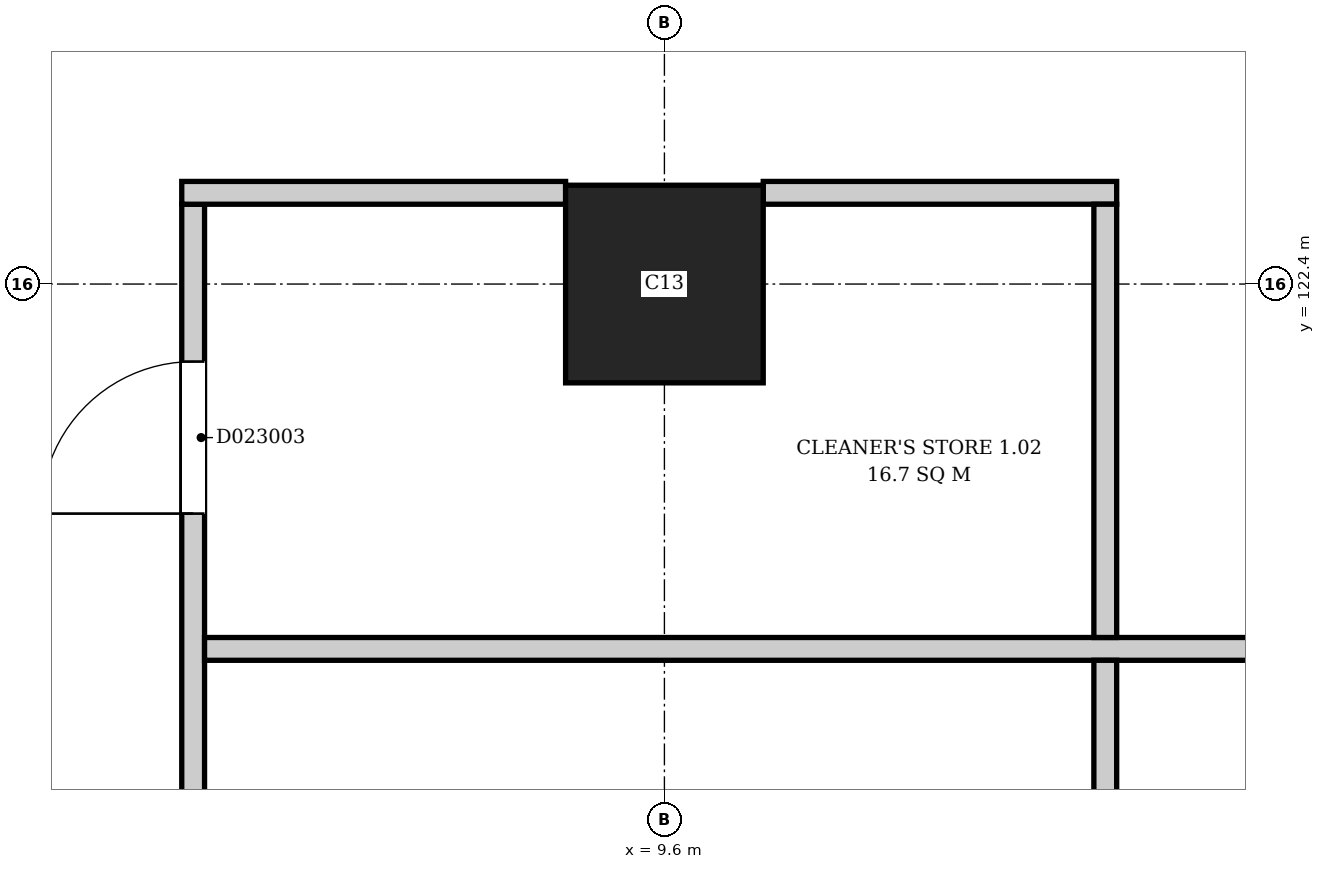
"""IFC4 building model, lengths in metres.
Left out: names, types, materials, properties, quantities, classifications, styles, units other than length and angle.
Written with IfcOpenShell. Run it as: python <this file> out.ifc"""

import sys

from ifc_helpers import new_model, si_unit, direction, frame, frame_2d, origin, origin_2d, place, context, subcontext, project, spatial, rectangle, extrude, element, fill, save


model = new_model("IFC4")
c1 = context("Model", 3, precision=1e-05, world=origin(), true_north=direction((0.0, 1.0)))
c2 = subcontext(c1, "Body", "Model", "MODEL_VIEW")
j1 = project(units=[si_unit("LENGTHUNIT", "METRE"), si_unit("PLANEANGLEUNIT", "RADIAN")], contexts=[c1])
p1 = place(None, origin())
s1 = spatial("IfcSite", under=j1, at=p1, CompositionType="ELEMENT")
p2 = place(p1, origin())
s2 = spatial("IfcBuilding", under=s1, at=p2, CompositionType="ELEMENT")
p3 = place(p2, frame((0.0, 0.0, 6.5)))
s3 = spatial("IfcBuildingStorey", under=s2, at=p3, CompositionType="ELEMENT", Elevation=6.5)
p4 = place(p3, frame((9.6, 122.4, 0.0), z_axis=(0.0, 0.0, 1.0), x_axis=(1.0, 0.0, 0.0)))
e1 = element("IfcColumn", 1, at=p4, inside=s3, PredefinedType="COLUMN", context=c2, shape_type="SweptSolid", body=[
    extrude(rectangle(XDim=1.3, YDim=1.3, at=origin_2d()), origin(), (0.0, 0.0, 1.0), 7.7),
])
p5 = place(p3, frame((6.5, 114.375, 0.0), z_axis=(0.0, 0.0, 1.0), x_axis=(0.0, 1.0, 0.0)))
e2 = element("IfcWall", 2, at=p5, inside=s3, PredefinedType="PARTITIONING", context=c2, shape_type="SweptSolid", body=[
    extrude(rectangle(XDim=8.55, YDim=0.15, at=frame_2d((4.275, 0.0))), origin(), (0.0, 0.0, 1.0), 7.29),
])
p6 = place(p5, frame((6.515, 0.0, 0.0)))
e3 = element("IfcOpeningElement", 3, at=p6, cuts=e2, PredefinedType="OPENING", context=c2, shape_type="SweptSolid", body=[
    extrude(rectangle(XDim=1.0, YDim=2.1, at=frame_2d((0.5, 1.05))), frame((0.0, 0.085, 0.0), z_axis=(0.0, -1.0, 0.0), x_axis=(1.0, 0.0, 0.0)), (0.0, 0.0, 1.0), 0.17),
])
p7 = place(p3, frame((6.425, 123.0, 0.0), z_axis=(0.0, 0.0, 1.0), x_axis=(1.0, 0.0, 0.0)))
e4 = element("IfcWall", 4, at=p7, inside=s3, PredefinedType="PARTITIONING", context=c2, shape_type="SweptSolid", body=[
    extrude(rectangle(XDim=2.525, YDim=0.15, at=frame_2d((1.262, 0.0))), origin(), (0.0, 0.0, 1.0), 7.29),
])
p8 = place(p3, frame((6.575, 120.0, 0.0), z_axis=(0.0, 0.0, 1.0), x_axis=(1.0, 0.0, 0.0)))
e5 = element("IfcWall", 5, at=p8, inside=s3, PredefinedType="PARTITIONING", context=c2, shape_type="SweptSolid", body=[
    extrude(rectangle(XDim=10.0, YDim=0.15, at=frame_2d((5.0, 0.0))), origin(), (0.0, 0.0, 1.0), 7.29),
])
p9 = place(p3, frame((10.25, 123.0, 0.0), z_axis=(0.0, 0.0, 1.0), x_axis=(1.0, 0.0, 0.0)))
e6 = element("IfcWall", 6, at=p9, inside=s3, PredefinedType="PARTITIONING", context=c2, shape_type="SweptSolid", body=[
    extrude(rectangle(XDim=2.325, YDim=0.15, at=frame_2d((1.163, 0.0))), origin(), (0.0, 0.0, 1.0), 7.29),
])
p10 = place(p3, frame((12.5, 114.375, 0.0), z_axis=(0.0, 0.0, 1.0), x_axis=(0.0, 1.0, 0.0)))
e7 = element("IfcWall", 7, at=p10, inside=s3, PredefinedType="PARTITIONING", context=c2, shape_type="SweptSolid", body=[
    extrude(rectangle(XDim=5.55, YDim=0.15, at=frame_2d((2.775, 0.0))), origin(), (0.0, 0.0, 1.0), 7.29),
])
p11 = place(p3, frame((12.5, 120.075, 0.0), z_axis=(0.0, 0.0, 1.0), x_axis=(0.0, 1.0, 0.0)))
e8 = element("IfcWall", 8, at=p11, inside=s3, PredefinedType="PARTITIONING", context=c2, shape_type="SweptSolid", body=[
    extrude(rectangle(XDim=2.85, YDim=0.15, at=frame_2d((1.425, 0.0))), origin(), (0.0, 0.0, 1.0), 7.29),
])
p12 = place(p6, origin())
e9 = element("IfcDoor", 9, at=p12, inside=s3, OperationType="SINGLE_SWING_LEFT", PredefinedType="DOOR", context=c2, shape_type="SweptSolid", body=[
    extrude(rectangle(XDim=1.0, YDim=2.1, at=frame_2d((0.5, 1.05))), frame((0.0, 0.025, 0.0), z_axis=(0.0, -1.0, 0.0), x_axis=(1.0, 0.0, 0.0)), (0.0, 0.0, 1.0), 0.05),
])
fill(e3, e9)
save(model, sys.argv[1])
